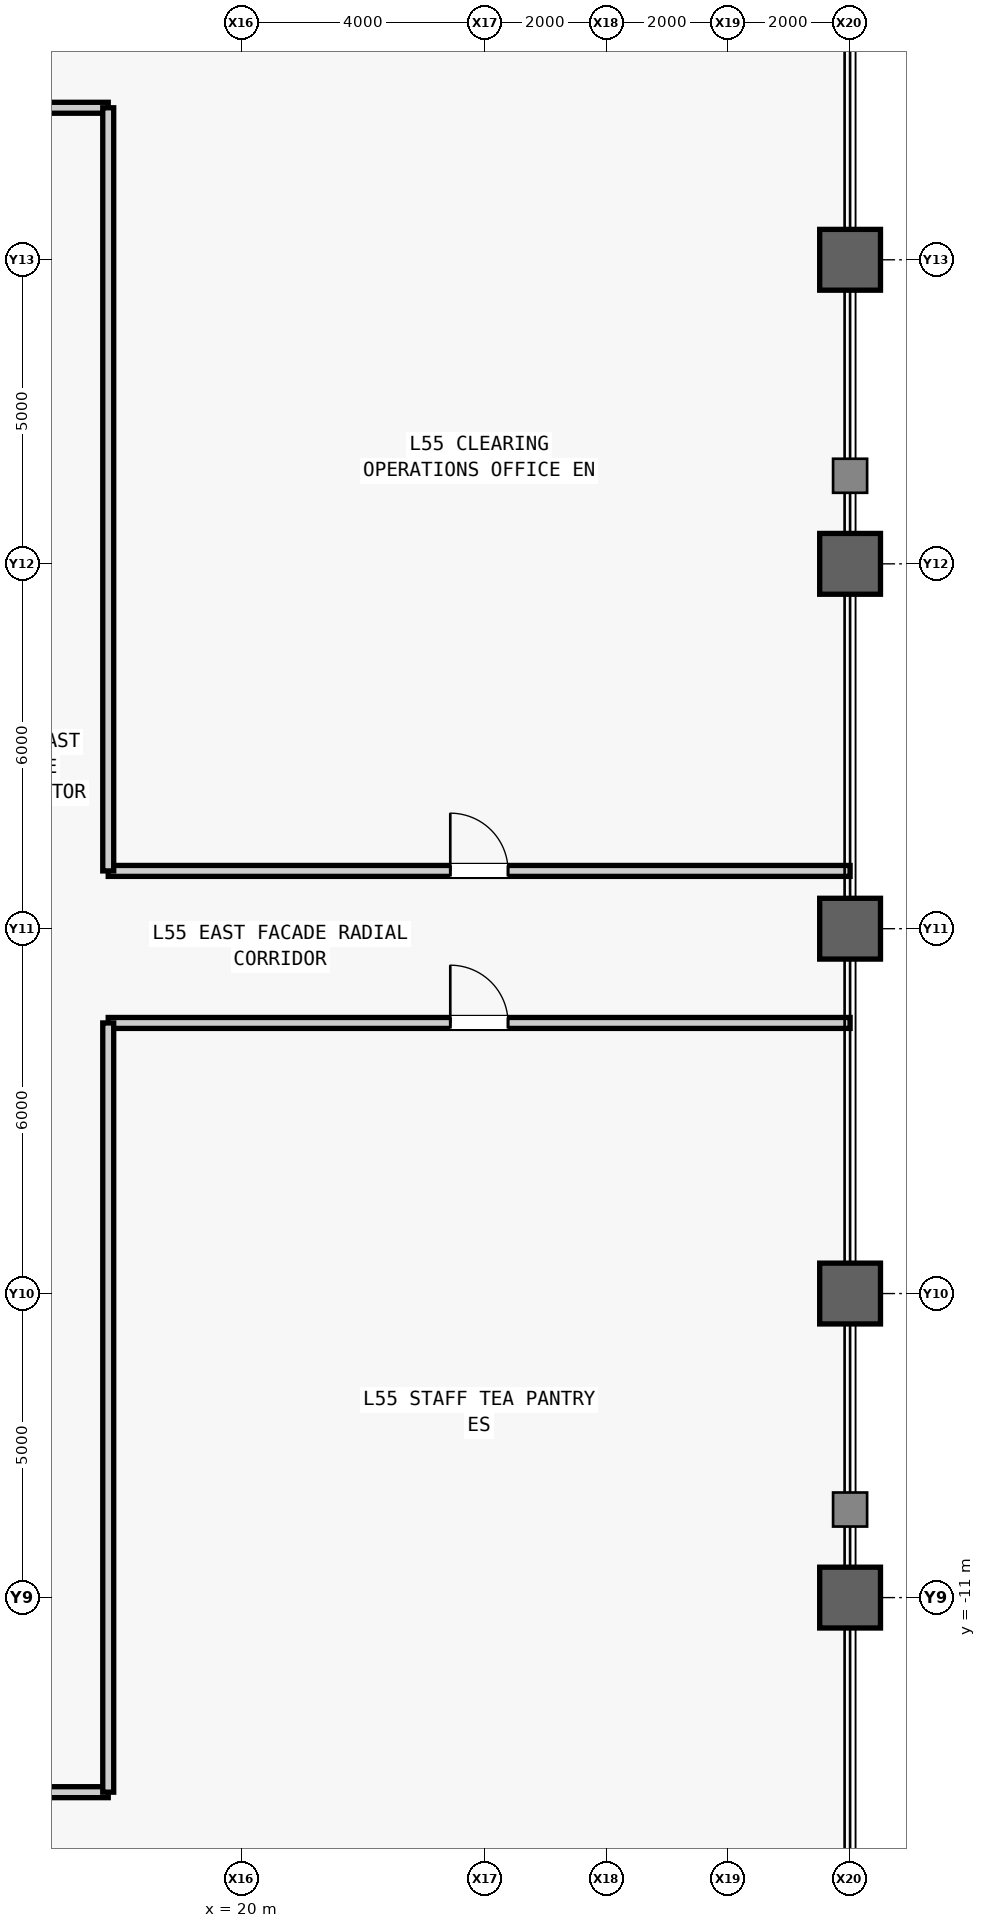
"""IFC4 building model, lengths in metres.
Left out: names, types, materials, properties, quantities, classifications, styles, units other than length and angle.
Written with IfcOpenShell. Run it as: python <this file> out.ifc"""

import sys

from ifc_helpers import new_model, si_unit, direction, frame, frame_2d, origin, origin_2d, place, context, subcontext, project, spatial, rectangle, hollow_rectangle, extrude, source, transform, mapped, element, fill, save


model = new_model("IFC4")
c1 = context("Model", 3, precision=1e-05, world=origin(), true_north=direction((0.0, 1.0)))
c2 = subcontext(c1, "Body", "Model", "MODEL_VIEW")
j1 = project(units=[si_unit("LENGTHUNIT", "METRE"), si_unit("PLANEANGLEUNIT", "RADIAN")], contexts=[c1])
p1 = place(None, origin())
s1 = spatial("IfcSite", under=j1, at=p1, CompositionType="ELEMENT")
p2 = place(p1, origin())
s2 = spatial("IfcBuilding", under=s1, at=p2, CompositionType="ELEMENT")
p3 = place(p2, frame((0.0, 0.0, 235.1)))
s3 = spatial("IfcBuildingStorey", under=s2, at=p3, CompositionType="ELEMENT", Elevation=235.1)
m1 = source(origin(), c2, "Body", "SweptSolid", [
    extrude(hollow_rectangle(XDim=1.0, YDim=1.0, WallThickness=0.055, at=origin_2d()), origin(), (0.0, 0.0, 1.0), 4.0),
])
for number, where, z_axis, x_axis in (
    (1, (30.0, -11.0, 0.0), (0.0, 0.0, 1.0), (1.0, 0.0, 0.0)),
    (2, (30.0, -6.0, 0.0), (0.0, 0.0, 1.0), (1.0, 0.0, 0.0)),
    (3, (30.0, 0.0, 0.0), (0.0, 0.0, 1.0), (1.0, 0.0, 0.0)),
    (4, (30.0, 6.0, 0.0), (0.0, 0.0, 1.0), (1.0, 0.0, 0.0)),
    (5, (30.0, 11.0, 0.0), (0.0, 0.0, 1.0), (1.0, 0.0, 0.0)),
):
    element("IfcColumn", number, at=place(p3, frame(where, z_axis=z_axis, x_axis=x_axis)), inside=s3, PredefinedType="COLUMN", context=c2, shape_type="MappedRepresentation", body=[
        mapped(m1, transform((0.0, 0.0, 0.0), scale=1.0)),
    ])
m2 = source(origin(), c2, "Body", "SweptSolid", [
    extrude(rectangle(XDim=2.45, YDim=0.18, at=frame_2d((1.225, 0.0))), origin(), (0.0, 0.0, 1.0), 3.78),
])
for number, where, z_axis, x_axis in (
    (6, (15.35, -14.2, 0.0), (0.0, 0.0, 1.0), (1.0, 0.0, 0.0)),
    (7, (15.35, 13.5, 0.0), (0.0, 0.0, 1.0), (1.0, 0.0, 0.0)),
):
    element("IfcWall", number, at=place(p3, frame(where, z_axis=z_axis, x_axis=x_axis)), inside=s3, PredefinedType="PARTITIONING", context=c2, shape_type="MappedRepresentation", body=[
        mapped(m2, transform((0.0, 0.0, 0.0), scale=1.0)),
    ])
m3 = source(origin(), c2, "Body", "SweptSolid", [
    extrude(rectangle(XDim=12.2, YDim=0.18, at=frame_2d((6.1, 0.0))), origin(), (0.0, 0.0, 1.0), 3.78),
])
p4 = place(p3, frame((17.8, -1.55, 0.0), z_axis=(0.0, 0.0, 1.0), x_axis=(1.0, 0.0, 0.0)))
e8 = element("IfcWall", 8, at=p4, inside=s3, PredefinedType="PARTITIONING", context=c2, shape_type="MappedRepresentation", body=[
    mapped(m3, transform((0.0, 0.0, 0.0), scale=1.0)),
])
m4 = source(origin(), c2, "Body", "SweptSolid", [
    extrude(rectangle(XDim=0.95, YDim=2.15, at=frame_2d((0.475, 1.075))), frame((0.0, 0.1, 0.0), z_axis=(0.0, -1.0, 0.0), x_axis=(1.0, 0.0, 0.0)), (0.0, 0.0, 1.0), 0.2),
])
p5 = place(p4, frame((5.625, 0.0, 0.0)))
e9 = element("IfcOpeningElement", 9, at=p5, cuts=e8, PredefinedType="OPENING", context=c2, shape_type="MappedRepresentation", body=[
    mapped(m4, transform((0.0, 0.0, 0.0), scale=1.0)),
])
m5 = source(origin(), c2, "Body", "SweptSolid", [
    extrude(rectangle(XDim=12.65, YDim=0.18, at=frame_2d((6.325, 0.0))), origin(), (0.0, 0.0, 1.0), 3.78),
])
p6 = place(p3, frame((17.8, -14.2, 0.0), z_axis=(0.0, 0.0, 1.0), x_axis=(0.0, 1.0, 0.0)))
e10 = element("IfcWall", 10, at=p6, inside=s3, PredefinedType="PARTITIONING", context=c2, shape_type="MappedRepresentation", body=[
    mapped(m5, transform((0.0, 0.0, 0.0), scale=1.0)),
])
p7 = place(p3, frame((17.8, 0.95, 0.0), z_axis=(0.0, 0.0, 1.0), x_axis=(1.0, 0.0, 0.0)))
e11 = element("IfcWall", 11, at=p7, inside=s3, PredefinedType="PARTITIONING", context=c2, shape_type="MappedRepresentation", body=[
    mapped(m3, transform((0.0, 0.0, 0.0), scale=1.0)),
])
p8 = place(p7, frame((5.625, 0.0, 0.0)))
e12 = element("IfcOpeningElement", 12, at=p8, cuts=e11, PredefinedType="OPENING", context=c2, shape_type="MappedRepresentation", body=[
    mapped(m4, transform((0.0, 0.0, 0.0), scale=1.0)),
])
m6 = source(origin(), c2, "Body", "SweptSolid", [
    extrude(rectangle(XDim=12.55, YDim=0.18, at=frame_2d((6.275, 0.0))), origin(), (0.0, 0.0, 1.0), 3.78),
])
p9 = place(p3, frame((17.8, 0.95, 0.0), z_axis=(0.0, 0.0, 1.0), x_axis=(0.0, 1.0, 0.0)))
e13 = element("IfcWall", 13, at=p9, inside=s3, PredefinedType="PARTITIONING", context=c2, shape_type="MappedRepresentation", body=[
    mapped(m6, transform((0.0, 0.0, 0.0), scale=1.0)),
])
m7 = source(origin(), c2, "Body", "SweptSolid", [
    extrude(rectangle(XDim=0.95, YDim=2.15, at=frame_2d((0.475, 1.075))), frame((0.0, 0.025, 0.0), z_axis=(0.0, -1.0, 0.0), x_axis=(1.0, 0.0, 0.0)), (0.0, 0.0, 1.0), 0.05),
])
p10 = place(p5, origin())
e14 = element("IfcDoor", 14, at=p10, inside=s3, OperationType="SINGLE_SWING_LEFT", PredefinedType="DOOR", context=c2, shape_type="MappedRepresentation", body=[
    mapped(m7, transform((0.0, 0.0, 0.0), scale=1.0)),
])
fill(e9, e14)
p11 = place(p8, origin())
e15 = element("IfcDoor", 15, at=p11, inside=s3, OperationType="SINGLE_SWING_LEFT", PredefinedType="DOOR", context=c2, shape_type="MappedRepresentation", body=[
    mapped(m7, transform((0.0, 0.0, 0.0), scale=1.0)),
])
fill(e12, e15)
save(model, sys.argv[1])
